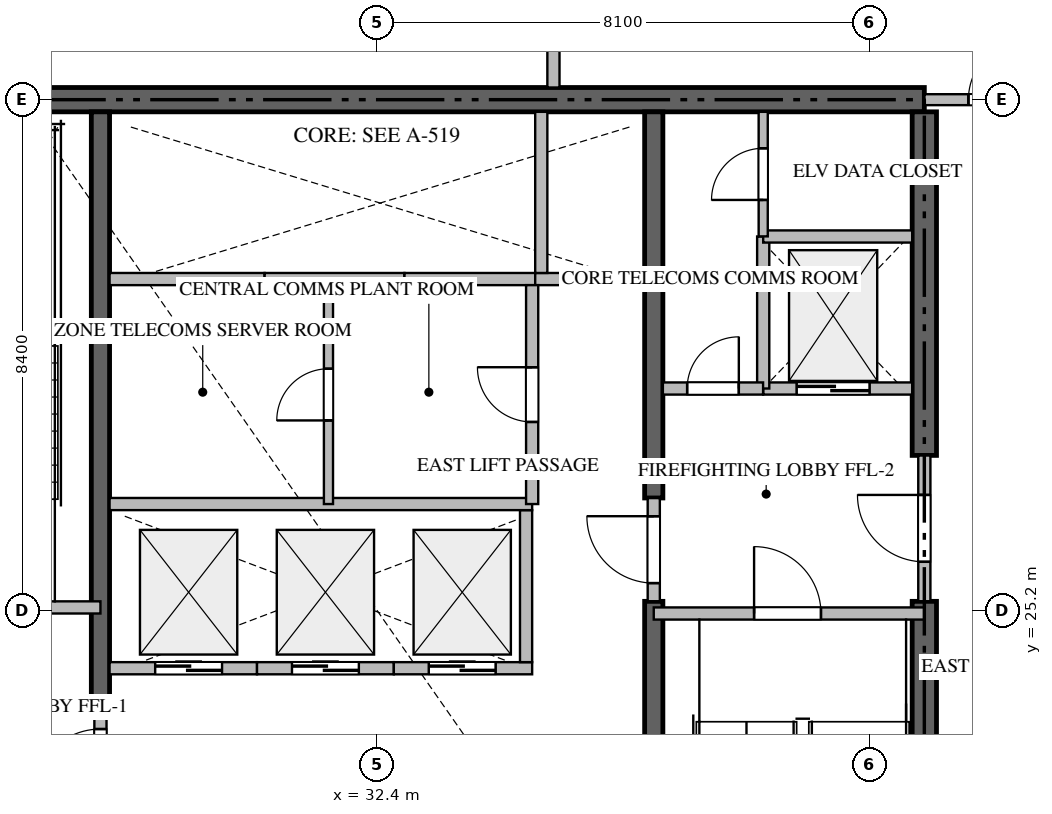
"""IFC4 building model, lengths in metres.
Left out: names, types, materials, properties, quantities, classifications, styles, units other than length and angle.
Written with IfcOpenShell. Run it as: python <this file> out.ifc"""

import sys

from ifc_helpers import new_model, si_unit, direction, frame, frame_2d, origin, place, context, subcontext, project, spatial, rectangle, extrude, source, transform, mapped, element, fill, save


model = new_model("IFC4")
c1 = context("Model", 3, precision=1e-05, world=origin(), true_north=direction((0.0, 1.0)))
c2 = subcontext(c1, "Body", "Model", "MODEL_VIEW")
j1 = project(units=[si_unit("LENGTHUNIT", "METRE"), si_unit("PLANEANGLEUNIT", "RADIAN")], contexts=[c1])
p1 = place(None, origin())
s1 = spatial("IfcSite", under=j1, at=p1, CompositionType="ELEMENT")
p2 = place(p1, origin())
s2 = spatial("IfcBuilding", under=s1, at=p2, CompositionType="ELEMENT")
p3 = place(p2, frame((0.0, 0.0, 131.4)))
s3 = spatial("IfcBuildingStorey", under=s2, at=p3, CompositionType="ELEMENT", Elevation=131.4)
p4 = place(p3, frame((41.4, 33.6, -0.26), z_axis=(0.0, 0.0, 1.0), x_axis=(-1.0, 0.0, 0.0)))
e1 = element("IfcWall", 1, at=p4, inside=s3, PredefinedType="SHEAR", context=c2, shape_type="SweptSolid", body=[
    extrude(rectangle(XDim=18.0, YDim=0.4, at=frame_2d((9.0, 0.0))), origin(), (0.0, 0.0, 1.0), 3.748),
])
p5 = place(p3, frame((41.4, 17.0, -0.26), z_axis=(0.0, 0.0, 1.0), x_axis=(0.0, 1.0, 0.0)))
e2 = element("IfcWall", 2, at=p5, inside=s3, PredefinedType="SHEAR", context=c2, shape_type="SweptSolid", body=[
    extrude(rectangle(XDim=8.35, YDim=0.4, at=frame_2d((4.175, 0.0))), origin(), (0.0, 0.0, 1.0), 3.748),
])
p6 = place(p3, frame((41.4, 27.75, -0.26), z_axis=(0.0, 0.0, 1.0), x_axis=(0.0, 1.0, 0.0)))
e3 = element("IfcWall", 3, at=p6, inside=s3, PredefinedType="SHEAR", context=c2, shape_type="SweptSolid", body=[
    extrude(rectangle(XDim=5.65, YDim=0.4, at=frame_2d((2.825, 0.0))), origin(), (0.0, 0.0, 1.0), 3.748),
])
p7 = place(p3, frame((27.85, 23.55, -0.26), z_axis=(0.0, 0.0, 1.0), x_axis=(0.0, 1.0, 0.0)))
e4 = element("IfcWall", 4, at=p7, inside=s3, PredefinedType="SHEAR", context=c2, shape_type="SweptSolid", body=[
    extrude(rectangle(XDim=9.85, YDim=0.3, at=frame_2d((4.925, 0.0))), origin(), (0.0, 0.0, 1.0), 3.748),
])
p8 = place(p3, frame((36.95, 17.0, -0.26), z_axis=(0.0, 0.0, 1.0), x_axis=(0.0, 1.0, 0.0)))
e5 = element("IfcWall", 5, at=p8, inside=s3, PredefinedType="SHEAR", context=c2, shape_type="SweptSolid", body=[
    extrude(rectangle(XDim=8.35, YDim=0.3, at=frame_2d((4.175, 0.0))), origin(), (0.0, 0.0, 1.0), 3.748),
])
p9 = place(p3, frame((36.95, 27.05, -0.26), z_axis=(0.0, 0.0, 1.0), x_axis=(0.0, 1.0, 0.0)))
e6 = element("IfcWall", 6, at=p9, inside=s3, PredefinedType="SHEAR", context=c2, shape_type="SweptSolid", body=[
    extrude(rectangle(XDim=6.35, YDim=0.3, at=frame_2d((3.175, 0.0))), origin(), (0.0, 0.0, 1.0), 3.748),
])
p10 = place(p3, frame((23.4, 25.25, 0.0), z_axis=(0.0, 0.0, 1.0), x_axis=(1.0, 0.0, 0.0)))
e7 = element("IfcWall", 7, at=p10, inside=s3, PredefinedType="STANDARD", context=c2, shape_type="SweptSolid", body=[
    extrude(rectangle(XDim=4.45, YDim=0.2, at=frame_2d((2.225, 0.0))), origin(), (0.0, 0.0, 1.0), 3.49),
])
p11 = place(p10, frame((1.65, 0.0, 0.0)))
e8 = element("IfcOpeningElement", 8, at=p11, cuts=e7, PredefinedType="OPENING", context=c2, shape_type="SweptSolid", body=[
    extrude(rectangle(XDim=1.1, YDim=2.15, at=frame_2d((0.55, 1.075))), frame((0.0, 0.11, 0.0), z_axis=(0.0, -1.0, 0.0), x_axis=(1.0, 0.0, 0.0)), (0.0, 0.0, 1.0), 0.22),
])
p12 = place(p3, frame((36.95, 25.15, 0.0), z_axis=(0.0, 0.0, 1.0), x_axis=(1.0, 0.0, 0.0)))
e9 = element("IfcWall", 9, at=p12, inside=s3, PredefinedType="STANDARD", context=c2, shape_type="SweptSolid", body=[
    extrude(rectangle(XDim=4.45, YDim=0.2, at=frame_2d((2.225, 0.0))), origin(), (0.0, 0.0, 1.0), 3.49),
])
p13 = place(p12, frame((1.65, 0.0, 0.0)))
e10 = element("IfcOpeningElement", 10, at=p13, cuts=e9, PredefinedType="OPENING", context=c2, shape_type="SweptSolid", body=[
    extrude(rectangle(XDim=1.1, YDim=2.15, at=frame_2d((0.55, 1.075))), frame((0.0, 0.11, 0.0), z_axis=(0.0, -1.0, 0.0), x_axis=(1.0, 0.0, 0.0)), (0.0, 0.0, 1.0), 0.22),
])
p14 = place(p3, frame((38.75, 28.85, 0.0), z_axis=(0.0, 0.0, 1.0), x_axis=(1.0, 0.0, 0.0)))
e11 = element("IfcWall", 11, at=p14, inside=s3, PredefinedType="STANDARD", context=c2, shape_type="SweptSolid", body=[
    extrude(rectangle(XDim=2.45, YDim=0.2, at=frame_2d((1.225, 0.0))), origin(), (0.0, 0.0, 1.0), 3.49),
])
p15 = place(p14, frame((0.55, 0.0, 0.0)))
e12 = element("IfcOpeningElement", 12, at=p15, cuts=e11, PredefinedType="OPENING", context=c2, shape_type="SweptSolid", body=[
    extrude(rectangle(XDim=1.2, YDim=2.2, at=frame_2d((0.6, 1.1))), frame((0.0, 0.11, 0.0), z_axis=(0.0, -1.0, 0.0), x_axis=(1.0, 0.0, 0.0)), (0.0, 0.0, 1.0), 0.22),
])
p16 = place(p3, frame((28.0, 24.25, 0.0), z_axis=(0.0, 0.0, 1.0), x_axis=(1.0, 0.0, 0.0)))
e13 = element("IfcWall", 13, at=p16, inside=s3, PredefinedType="STANDARD", context=c2, shape_type="SweptSolid", body=[
    extrude(rectangle(XDim=2.425, YDim=0.2, at=frame_2d((1.212, 0.0))), origin(), (0.0, 0.0, 1.0), 3.49),
])
p17 = place(p16, frame((0.75, 0.0, 0.0)))
e14 = element("IfcOpeningElement", 14, at=p17, cuts=e13, PredefinedType="OPENING", context=c2, shape_type="SweptSolid", body=[
    extrude(rectangle(XDim=1.1, YDim=2.2, at=frame_2d((0.55, 1.1))), frame((0.0, 0.11, 0.0), z_axis=(0.0, -1.0, 0.0), x_axis=(1.0, 0.0, 0.0)), (0.0, 0.0, 1.0), 0.22),
])
p18 = place(p3, frame((30.425, 24.25, 0.0), z_axis=(0.0, 0.0, 1.0), x_axis=(1.0, 0.0, 0.0)))
e15 = element("IfcWall", 15, at=p18, inside=s3, PredefinedType="STANDARD", context=c2, shape_type="SweptSolid", body=[
    extrude(rectangle(XDim=2.25, YDim=0.2, at=frame_2d((1.125, 0.0))), origin(), (0.0, 0.0, 1.0), 3.49),
])
p19 = place(p18, frame((0.575, 0.0, 0.0)))
e16 = element("IfcOpeningElement", 16, at=p19, cuts=e15, PredefinedType="OPENING", context=c2, shape_type="SweptSolid", body=[
    extrude(rectangle(XDim=1.1, YDim=2.2, at=frame_2d((0.55, 1.1))), frame((0.0, 0.11, 0.0), z_axis=(0.0, -1.0, 0.0), x_axis=(1.0, 0.0, 0.0)), (0.0, 0.0, 1.0), 0.22),
])
p20 = place(p3, frame((32.675, 24.25, 0.0), z_axis=(0.0, 0.0, 1.0), x_axis=(1.0, 0.0, 0.0)))
e17 = element("IfcWall", 17, at=p20, inside=s3, PredefinedType="STANDARD", context=c2, shape_type="SweptSolid", body=[
    extrude(rectangle(XDim=2.275, YDim=0.2, at=frame_2d((1.137, 0.0))), origin(), (0.0, 0.0, 1.0), 3.49),
])
p21 = place(p20, frame((0.575, 0.0, 0.0)))
e18 = element("IfcOpeningElement", 18, at=p21, cuts=e17, PredefinedType="OPENING", context=c2, shape_type="SweptSolid", body=[
    extrude(rectangle(XDim=1.1, YDim=2.2, at=frame_2d((0.55, 1.1))), frame((0.0, 0.11, 0.0), z_axis=(0.0, -1.0, 0.0), x_axis=(1.0, 0.0, 0.0)), (0.0, 0.0, 1.0), 0.22),
])
p22 = place(p3, frame((34.85, 24.35, 0.0), z_axis=(0.0, 0.0, 1.0), x_axis=(0.0, 1.0, 0.0)))
e19 = element("IfcWall", 19, at=p22, inside=s3, PredefinedType="STANDARD", context=c2, shape_type="SweptSolid", body=[
    extrude(rectangle(XDim=2.5, YDim=0.2, at=frame_2d((1.25, 0.0))), origin(), (0.0, 0.0, 1.0), 3.49),
])
p23 = place(p3, frame((28.0, 30.65, 0.0), z_axis=(0.0, 0.0, 1.0), x_axis=(1.0, 0.0, 0.0)))
e20 = element("IfcWall", 20, at=p23, inside=s3, PredefinedType="STANDARD", context=c2, shape_type="SweptSolid", body=[
    extrude(rectangle(XDim=2.55, YDim=0.2, at=frame_2d((1.275, 0.0))), origin(), (0.0, 0.0, 1.0), 3.49),
])
p24 = place(p3, frame((30.55, 30.65, 0.0), z_axis=(0.0, 0.0, 1.0), x_axis=(1.0, 0.0, 0.0)))
e21 = element("IfcWall", 21, at=p24, inside=s3, PredefinedType="STANDARD", context=c2, shape_type="SweptSolid", body=[
    extrude(rectangle(XDim=2.3, YDim=0.2, at=frame_2d((1.15, 0.0))), origin(), (0.0, 0.0, 1.0), 3.49),
])
p25 = place(p3, frame((32.85, 30.65, 0.0), z_axis=(0.0, 0.0, 1.0), x_axis=(1.0, 0.0, 0.0)))
e22 = element("IfcWall", 22, at=p25, inside=s3, PredefinedType="STANDARD", context=c2, shape_type="SweptSolid", body=[
    extrude(rectangle(XDim=2.15, YDim=0.2, at=frame_2d((1.075, 0.0))), origin(), (0.0, 0.0, 1.0), 3.49),
])
p26 = place(p3, frame((35.0, 30.65, 0.0), z_axis=(0.0, 0.0, 1.0), x_axis=(1.0, 0.0, 0.0)))
e23 = element("IfcWall", 23, at=p26, inside=s3, PredefinedType="STANDARD", context=c2, shape_type="SweptSolid", body=[
    extrude(rectangle(XDim=1.8, YDim=0.2, at=frame_2d((0.9, 0.0))), origin(), (0.0, 0.0, 1.0), 3.49),
])
p27 = place(p3, frame((35.1, 30.75, 0.0), z_axis=(0.0, 0.0, 1.0), x_axis=(0.0, 1.0, 0.0)))
e24 = element("IfcWall", 24, at=p27, inside=s3, PredefinedType="STANDARD", context=c2, shape_type="SweptSolid", body=[
    extrude(rectangle(XDim=2.65, YDim=0.2, at=frame_2d((1.325, 0.0))), origin(), (0.0, 0.0, 1.0), 3.49),
])
p28 = place(p3, frame((38.75, 28.85, 0.0), z_axis=(0.0, 0.0, 1.0), x_axis=(0.0, 1.0, 0.0)))
e25 = element("IfcWall", 25, at=p28, inside=s3, PredefinedType="STANDARD", context=c2, shape_type="SweptSolid", body=[
    extrude(rectangle(XDim=2.5, YDim=0.2, at=frame_2d((1.25, 0.0))), origin(), (0.0, 0.0, 1.0), 3.49),
])
p29 = place(p3, frame((38.75, 31.35, 0.0), z_axis=(0.0, 0.0, 1.0), x_axis=(1.0, 0.0, 0.0)))
e26 = element("IfcWall", 26, at=p29, inside=s3, PredefinedType="STANDARD", context=c2, shape_type="SweptSolid", body=[
    extrude(rectangle(XDim=2.45, YDim=0.2, at=frame_2d((1.225, 0.0))), origin(), (0.0, 0.0, 1.0), 3.49),
])
p30 = place(p3, frame((37.1, 28.85, 0.0), z_axis=(0.0, 0.0, 1.0), x_axis=(1.0, 0.0, 0.0)))
e27 = element("IfcWall", 27, at=p30, inside=s3, PredefinedType="STANDARD", context=c2, shape_type="SweptSolid", body=[
    extrude(rectangle(XDim=1.648, YDim=0.2, at=frame_2d((0.824, 0.0))), origin(), (0.0, 0.0, 1.0), 3.49),
])
p31 = place(p30, frame((0.399, 0.0, 0.0)))
e28 = element("IfcOpeningElement", 28, at=p31, cuts=e27, PredefinedType="OPENING", context=c2, shape_type="SweptSolid", body=[
    extrude(rectangle(XDim=0.85, YDim=2.1, at=frame_2d((0.425, 1.05))), frame((0.0, 0.11, 0.0), z_axis=(0.0, -1.0, 0.0), x_axis=(1.0, 0.0, 0.0)), (0.0, 0.0, 1.0), 0.22),
])
p32 = place(p3, frame((41.4, 25.352, 0.0), z_axis=(0.0, 0.0, 1.0), x_axis=(0.0, 1.0, 0.0)))
e29 = element("IfcWall", 29, at=p32, inside=s3, PredefinedType="STANDARD", context=c2, shape_type="SweptSolid", body=[
    extrude(rectangle(XDim=2.396, YDim=0.2, at=frame_2d((1.198, 0.0))), origin(), (0.0, 0.0, 1.0), 3.49),
])
p33 = place(p32, frame((0.648, 0.0, 0.0)))
e30 = element("IfcOpeningElement", 30, at=p33, cuts=e29, PredefinedType="OPENING", context=c2, shape_type="SweptSolid", body=[
    extrude(rectangle(XDim=1.1, YDim=2.15, at=frame_2d((0.55, 1.075))), frame((0.0, 0.11, 0.0), z_axis=(0.0, -1.0, 0.0), x_axis=(1.0, 0.0, 0.0)), (0.0, 0.0, 1.0), 0.22),
])
p34 = place(p3, frame((27.85, 21.852, 0.0), z_axis=(0.0, 0.0, 1.0), x_axis=(0.0, 1.0, 0.0)))
e31 = element("IfcWall", 31, at=p34, inside=s3, PredefinedType="STANDARD", context=c2, shape_type="SweptSolid", body=[
    extrude(rectangle(XDim=1.696, YDim=0.2, at=frame_2d((0.848, 0.0))), origin(), (0.0, 0.0, 1.0), 3.49),
])
p35 = place(p34, frame((0.298, 0.0, 0.0)))
e32 = element("IfcOpeningElement", 32, at=p35, cuts=e31, PredefinedType="OPENING", context=c2, shape_type="SweptSolid", body=[
    extrude(rectangle(XDim=1.1, YDim=2.15, at=frame_2d((0.55, 1.075))), frame((0.0, 0.11, 0.0), z_axis=(0.0, -1.0, 0.0), x_axis=(1.0, 0.0, 0.0)), (0.0, 0.0, 1.0), 0.22),
])
p36 = place(p3, frame((36.95, 25.352, 0.0), z_axis=(0.0, 0.0, 1.0), x_axis=(0.0, 1.0, 0.0)))
e33 = element("IfcWall", 33, at=p36, inside=s3, PredefinedType="STANDARD", context=c2, shape_type="SweptSolid", body=[
    extrude(rectangle(XDim=1.696, YDim=0.2, at=frame_2d((0.848, 0.0))), origin(), (0.0, 0.0, 1.0), 3.49),
])
p37 = place(p36, frame((0.298, 0.0, 0.0)))
e34 = element("IfcOpeningElement", 34, at=p37, cuts=e33, PredefinedType="OPENING", context=c2, shape_type="SweptSolid", body=[
    extrude(rectangle(XDim=1.1, YDim=2.15, at=frame_2d((0.55, 1.075))), frame((0.0, 0.11, 0.0), z_axis=(0.0, -1.0, 0.0), x_axis=(1.0, 0.0, 0.0)), (0.0, 0.0, 1.0), 0.22),
])
p38 = place(p3, frame((28.0, 26.95, 0.0), z_axis=(0.0, 0.0, 1.0), x_axis=(1.0, 0.0, 0.0)))
e35 = element("IfcWall", 35, at=p38, inside=s3, PredefinedType="STANDARD", context=c2, shape_type="SweptSolid", body=[
    extrude(rectangle(XDim=6.95, YDim=0.2, at=frame_2d((3.475, 0.0))), origin(), (0.0, 0.0, 1.0), 3.49),
])
p39 = place(p3, frame((38.75, 31.352, 0.0), z_axis=(0.0, 0.0, 1.0), x_axis=(0.0, 1.0, 0.0)))
e36 = element("IfcWall", 36, at=p39, inside=s3, PredefinedType="PARTITIONING", context=c2, shape_type="SweptSolid", body=[
    extrude(rectangle(XDim=2.048, YDim=0.15, at=frame_2d((1.024, 0.0))), origin(), (0.0, 0.0, 1.0), 3.49),
])
p40 = place(p39, frame((0.599, 0.0, 0.0)))
e37 = element("IfcOpeningElement", 37, at=p40, cuts=e36, PredefinedType="OPENING", context=c2, shape_type="SweptSolid", body=[
    extrude(rectangle(XDim=0.85, YDim=2.1, at=frame_2d((0.425, 1.05))), frame((0.0, 0.085, 0.0), z_axis=(0.0, -1.0, 0.0), x_axis=(1.0, 0.0, 0.0)), (0.0, 0.0, 1.0), 0.17),
])
p41 = place(p3, frame((34.95, 26.95, 0.0), z_axis=(0.0, 0.0, 1.0), x_axis=(0.0, 1.0, 0.0)))
e38 = element("IfcWall", 38, at=p41, inside=s3, PredefinedType="STANDARD", context=c2, shape_type="SweptSolid", body=[
    extrude(rectangle(XDim=3.6, YDim=0.2, at=frame_2d((1.8, 0.0))), origin(), (0.0, 0.0, 1.0), 3.49),
])
p42 = place(p41, frame((1.35, 0.0, 0.0)))
e39 = element("IfcOpeningElement", 39, at=p42, cuts=e38, PredefinedType="OPENING", context=c2, shape_type="SweptSolid", body=[
    extrude(rectangle(XDim=0.9, YDim=2.1, at=frame_2d((0.45, 1.05))), frame((0.0, 0.11, 0.0), z_axis=(0.0, -1.0, 0.0), x_axis=(1.0, 0.0, 0.0)), (0.0, 0.0, 1.0), 0.22),
])
p43 = place(p3, frame((31.6, 26.95, 0.0), z_axis=(0.0, 0.0, 1.0), x_axis=(0.0, 1.0, 0.0)))
e40 = element("IfcWall", 40, at=p43, inside=s3, PredefinedType="PARTITIONING", context=c2, shape_type="SweptSolid", body=[
    extrude(rectangle(XDim=3.6, YDim=0.15, at=frame_2d((1.8, 0.0))), origin(), (0.0, 0.0, 1.0), 3.49),
])
p44 = place(p43, frame((1.375, 0.0, 0.0)))
e41 = element("IfcOpeningElement", 41, at=p44, cuts=e40, PredefinedType="OPENING", context=c2, shape_type="SweptSolid", body=[
    extrude(rectangle(XDim=0.85, YDim=2.1, at=frame_2d((0.425, 1.05))), frame((0.0, 0.085, 0.0), z_axis=(0.0, -1.0, 0.0), x_axis=(1.0, 0.0, 0.0)), (0.0, 0.0, 1.0), 0.17),
])
p45 = place(p3, frame((35.3, 33.8, 0.0), z_axis=(0.0, 0.0, 1.0), x_axis=(0.0, 1.0, 0.0)))
e42 = element("IfcWall", 42, at=p45, inside=s3, PredefinedType="PARTITIONING", context=c2, shape_type="SweptSolid", body=[
    extrude(rectangle(XDim=15.118, YDim=0.2, at=frame_2d((7.559, 0.0))), origin(), (0.0, 0.0, 1.0), 3.49),
])
p46 = place(p3, frame((41.402, 33.6, 0.0), z_axis=(0.0, 0.0, 1.0), x_axis=(1.0, 0.0, 0.0)))
e43 = element("IfcWall", 43, at=p46, inside=s3, PredefinedType="PARTITIONING", context=c2, shape_type="SweptSolid", body=[
    extrude(rectangle(XDim=2.446, YDim=0.18, at=frame_2d((1.223, 0.0))), origin(), (0.0, 0.0, 1.0), 3.49),
])
p47 = place(p46, frame((0.723, 0.0, 0.0)))
e44 = element("IfcOpeningElement", 44, at=p47, cuts=e43, PredefinedType="OPENING", context=c2, shape_type="SweptSolid", body=[
    extrude(rectangle(XDim=1.0, YDim=2.15, at=frame_2d((0.5, 1.075))), frame((0.0, 0.1, 0.0), z_axis=(0.0, -1.0, 0.0), x_axis=(1.0, 0.0, 0.0)), (0.0, 0.0, 1.0), 0.2),
])
m1 = source(origin(), c2, "Body", "SweptSolid", [
    extrude(rectangle(XDim=1.1, YDim=2.15, at=frame_2d((0.55, 1.075))), frame((0.0, 0.025, 0.0), z_axis=(0.0, -1.0, 0.0), x_axis=(1.0, 0.0, 0.0)), (0.0, 0.0, 1.0), 0.05),
])
p48 = place(p13, origin())
e45 = element("IfcDoor", 45, at=p48, inside=s3, OperationType="SINGLE_SWING_LEFT", PredefinedType="DOOR", context=c2, shape_type="MappedRepresentation", body=[
    mapped(m1, transform((0.0, 0.0, 0.0), scale=1.0)),
])
fill(e10, e45)
m2 = source(origin(), c2, "Body", "SweptSolid", [
    extrude(rectangle(XDim=1.2, YDim=2.2, at=frame_2d((0.6, 1.1))), frame((0.0, 0.025, 0.0), z_axis=(0.0, -1.0, 0.0), x_axis=(1.0, 0.0, 0.0)), (0.0, 0.0, 1.0), 0.05),
])
p49 = place(p15, origin())
e46 = element("IfcDoor", 46, at=p49, inside=s3, OperationType="DOUBLE_DOOR_SLIDING", PredefinedType="DOOR", context=c2, shape_type="MappedRepresentation", body=[
    mapped(m2, transform((0.0, 0.0, 0.0), scale=1.0)),
])
fill(e12, e46)
m3 = source(origin(), c2, "Body", "SweptSolid", [
    extrude(rectangle(XDim=1.1, YDim=2.2, at=frame_2d((0.55, 1.1))), frame((0.0, 0.025, 0.0), z_axis=(0.0, -1.0, 0.0), x_axis=(1.0, 0.0, 0.0)), (0.0, 0.0, 1.0), 0.05),
])
p50 = place(p17, origin())
e47 = element("IfcDoor", 47, at=p50, inside=s3, OperationType="DOUBLE_DOOR_SLIDING", PredefinedType="DOOR", context=c2, shape_type="MappedRepresentation", body=[
    mapped(m3, transform((0.0, 0.0, 0.0), scale=1.0)),
])
fill(e14, e47)
p51 = place(p19, origin())
e48 = element("IfcDoor", 48, at=p51, inside=s3, OperationType="DOUBLE_DOOR_SLIDING", PredefinedType="DOOR", context=c2, shape_type="MappedRepresentation", body=[
    mapped(m3, transform((0.0, 0.0, 0.0), scale=1.0)),
])
fill(e16, e48)
p52 = place(p21, origin())
e49 = element("IfcDoor", 49, at=p52, inside=s3, OperationType="DOUBLE_DOOR_SLIDING", PredefinedType="DOOR", context=c2, shape_type="MappedRepresentation", body=[
    mapped(m3, transform((0.0, 0.0, 0.0), scale=1.0)),
])
fill(e18, e49)
m4 = source(origin(), c2, "Body", "SweptSolid", [
    extrude(rectangle(XDim=0.85, YDim=2.1, at=frame_2d((0.425, 1.05))), frame((0.0, 0.025, 0.0), z_axis=(0.0, -1.0, 0.0), x_axis=(1.0, 0.0, 0.0)), (0.0, 0.0, 1.0), 0.05),
])
p53 = place(p31, origin())
e50 = element("IfcDoor", 50, at=p53, inside=s3, OperationType="SINGLE_SWING_RIGHT", PredefinedType="DOOR", context=c2, shape_type="MappedRepresentation", body=[
    mapped(m4, transform((0.0, 0.0, 0.0), scale=1.0)),
])
fill(e28, e50)
p54 = place(p33, origin())
e51 = element("IfcDoor", 51, at=p54, inside=s3, OperationType="SINGLE_SWING_RIGHT", PredefinedType="DOOR", context=c2, shape_type="MappedRepresentation", body=[
    mapped(m1, transform((0.0, 0.0, 0.0), scale=1.0)),
])
fill(e30, e51)
p55 = place(p35, origin())
e52 = element("IfcDoor", 52, at=p55, inside=s3, OperationType="SINGLE_SWING_LEFT", PredefinedType="DOOR", context=c2, shape_type="MappedRepresentation", body=[
    mapped(m1, transform((0.0, 0.0, 0.0), scale=1.0)),
])
fill(e32, e52)
p56 = place(p37, origin())
e53 = element("IfcDoor", 53, at=p56, inside=s3, OperationType="SINGLE_SWING_RIGHT", PredefinedType="DOOR", context=c2, shape_type="MappedRepresentation", body=[
    mapped(m1, transform((0.0, 0.0, 0.0), scale=1.0)),
])
fill(e34, e53)
p57 = place(p40, origin())
e54 = element("IfcDoor", 54, at=p57, inside=s3, OperationType="SINGLE_SWING_LEFT", PredefinedType="DOOR", context=c2, shape_type="MappedRepresentation", body=[
    mapped(m4, transform((0.0, 0.0, 0.0), scale=1.0)),
])
fill(e37, e54)
m5 = source(origin(), c2, "Body", "SweptSolid", [
    extrude(rectangle(XDim=0.9, YDim=2.1, at=frame_2d((0.45, 1.05))), frame((0.0, 0.025, 0.0), z_axis=(0.0, -1.0, 0.0), x_axis=(1.0, 0.0, 0.0)), (0.0, 0.0, 1.0), 0.05),
])
p58 = place(p42, origin())
e55 = element("IfcDoor", 55, at=p58, inside=s3, OperationType="SINGLE_SWING_RIGHT", PredefinedType="DOOR", context=c2, shape_type="MappedRepresentation", body=[
    mapped(m5, transform((0.0, 0.0, 0.0), scale=1.0)),
])
fill(e39, e55)
p59 = place(p44, origin())
e56 = element("IfcDoor", 56, at=p59, inside=s3, OperationType="SINGLE_SWING_LEFT", PredefinedType="DOOR", context=c2, shape_type="MappedRepresentation", body=[
    mapped(m4, transform((0.0, 0.0, 0.0), scale=1.0)),
])
fill(e41, e56)
m6 = source(origin(), c2, "Body", "SweptSolid", [
    extrude(rectangle(XDim=1.0, YDim=2.15, at=frame_2d((0.5, 1.075))), frame((0.0, 0.025, 0.0), z_axis=(0.0, -1.0, 0.0), x_axis=(1.0, 0.0, 0.0)), (0.0, 0.0, 1.0), 0.05),
])
p60 = place(p47, origin())
e57 = element("IfcDoor", 57, at=p60, inside=s3, OperationType="SINGLE_SWING_RIGHT", PredefinedType="DOOR", context=c2, shape_type="MappedRepresentation", body=[
    mapped(m6, transform((0.0, 0.0, 0.0), scale=1.0)),
])
fill(e44, e57)
save(model, sys.argv[1])
